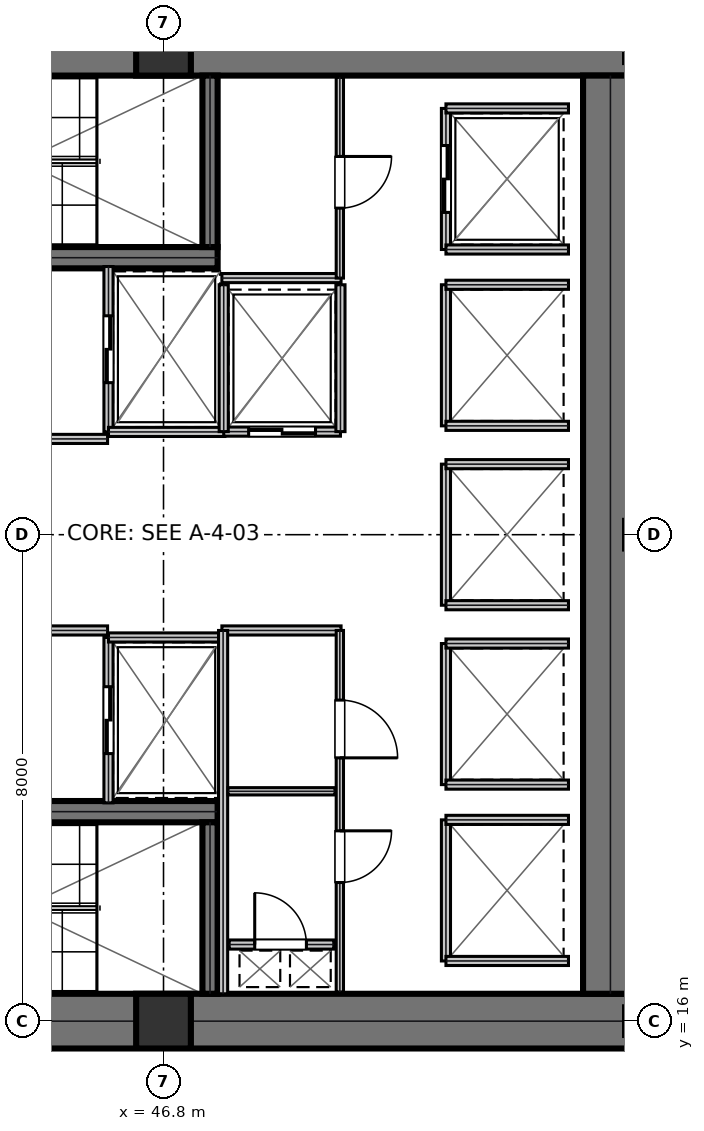
"""IFC4 building model, lengths in metres.
Left out: names, types, materials, properties, quantities, classifications, styles, units other than length and angle.
Written with IfcOpenShell. Run it as: python <this file> out.ifc"""

import sys

from ifc_helpers import new_model, si_unit, direction, frame, frame_2d, origin, origin_2d, place, context, subcontext, project, spatial, rectangle, extrude, element, fill, save


model = new_model("IFC4")
c1 = context("Model", 3, precision=1e-05, world=origin(), true_north=direction((0.0, 1.0)))
c2 = subcontext(c1, "Body", "Model", "MODEL_VIEW")
j1 = project(units=[si_unit("LENGTHUNIT", "METRE"), si_unit("PLANEANGLEUNIT", "RADIAN")], contexts=[c1])
p1 = place(None, origin())
s1 = spatial("IfcSite", under=j1, at=p1, CompositionType="ELEMENT")
p2 = place(p1, origin())
s2 = spatial("IfcBuilding", under=s1, at=p2, CompositionType="ELEMENT")
p3 = place(p2, frame((0.0, 0.0, 27.0)))
s3 = spatial("IfcBuildingStorey", under=s2, at=p3, CompositionType="ELEMENT", Elevation=27.0)
for number, where, z_axis, x_axis in (
    (1, (38.8, 32.0, 0.0), (0.0, 0.0, 1.0), (1.0, 0.0, 0.0)),
    (2, (38.8, 16.0, 0.0), (0.0, 0.0, 1.0), (1.0, 0.0, 0.0)),
):
    element("IfcWall", number, at=place(p3, frame(where, z_axis=z_axis, x_axis=x_axis)), inside=s3, PredefinedType="SHEAR", context=c2, shape_type="SweptSolid", body=[
        extrude(rectangle(XDim=16.0, YDim=0.9, at=frame_2d((8.0, 0.0))), origin(), (0.0, 0.0, 1.0), 5.08),
    ])
p4 = place(p3, frame((54.15, 16.45, 0.0), z_axis=(0.0, 0.0, 1.0), x_axis=(0.0, 1.0, 0.0)))
e3 = element("IfcWall", 3, at=p4, inside=s3, PredefinedType="SHEAR", context=c2, shape_type="SweptSolid", body=[
    extrude(rectangle(XDim=15.1, YDim=0.9, at=frame_2d((7.55, 0.0))), origin(), (0.0, 0.0, 1.0), 5.08),
])
p5 = place(p3, frame((39.98, 28.555, 0.0), z_axis=(0.0, 0.0, 1.0), x_axis=(1.0, 0.0, 0.0)))
e4 = element("IfcWall", 4, at=p5, inside=s3, PredefinedType="SHEAR", context=c2, shape_type="SweptSolid", body=[
    extrude(rectangle(XDim=7.71, YDim=0.35, at=frame_2d((3.855, 0.0))), origin(), (0.0, 0.0, 1.0), 5.08),
])
p6 = place(p5, frame((0.25, 0.0, 0.0)))
e5 = element("IfcOpeningElement", 5, at=p6, cuts=e4, PredefinedType="OPENING", context=c2, shape_type="SweptSolid", body=[
    extrude(rectangle(XDim=1.1, YDim=2.15, at=frame_2d((0.55, 1.075))), frame((0.0, 0.185, 0.0), z_axis=(0.0, -1.0, 0.0), x_axis=(1.0, 0.0, 0.0)), (0.0, 0.0, 1.0), 0.37),
])
p7 = place(p3, frame((39.98, 19.445, 0.0), z_axis=(0.0, 0.0, 1.0), x_axis=(1.0, 0.0, 0.0)))
e6 = element("IfcWall", 6, at=p7, inside=s3, PredefinedType="SHEAR", context=c2, shape_type="SweptSolid", body=[
    extrude(rectangle(XDim=7.71, YDim=0.35, at=frame_2d((3.855, 0.0))), origin(), (0.0, 0.0, 1.0), 5.08),
])
p8 = place(p7, frame((0.25, 0.0, 0.0)))
e7 = element("IfcOpeningElement", 7, at=p8, cuts=e6, PredefinedType="OPENING", context=c2, shape_type="SweptSolid", body=[
    extrude(rectangle(XDim=1.1, YDim=2.15, at=frame_2d((0.55, 1.075))), frame((0.0, 0.185, 0.0), z_axis=(0.0, -1.0, 0.0), x_axis=(1.0, 0.0, 0.0)), (0.0, 0.0, 1.0), 0.37),
])
for number, where, z_axis, x_axis in (
    (8, (47.565, 28.73, 0.0), (0.0, 0.0, 1.0), (0.0, 1.0, 0.0)),
    (9, (47.565, 16.45, 0.0), (0.0, 0.0, 1.0), (0.0, 1.0, 0.0)),
):
    element("IfcWall", number, at=place(p3, frame(where, z_axis=z_axis, x_axis=x_axis)), inside=s3, PredefinedType="SHEAR", context=c2, shape_type="SweptSolid", body=[
        extrude(rectangle(XDim=2.82, YDim=0.25, at=frame_2d((1.41, 0.0))), origin(), (0.0, 0.0, 1.0), 5.08),
    ])
for number, where, z_axis, x_axis in (
    (10, (46.8, 16.0, 0.0), (0.0, 0.0, 1.0), (1.0, 0.0, 0.0)),
    (11, (46.8, 32.0, 0.0), (0.0, 0.0, 1.0), (1.0, 0.0, 0.0)),
):
    element("IfcColumn", number, at=place(p3, frame(where, z_axis=z_axis, x_axis=x_axis)), inside=s3, PredefinedType="COLUMN", context=c2, shape_type="SweptSolid", body=[
        extrude(rectangle(XDim=0.9, YDim=0.9, at=origin_2d()), origin(), (0.0, 0.0, 1.0), 5.395),
    ])
p9 = place(p3, frame((39.98, 25.575, 0.0), z_axis=(0.0, 0.0, 1.0), x_axis=(1.0, 0.0, 0.0)))
e12 = element("IfcWall", 12, at=p9, inside=s3, PredefinedType="PARTITIONING", context=c2, shape_type="SweptSolid", body=[
    extrude(rectangle(XDim=5.9, YDim=0.15, at=frame_2d((2.95, 0.0))), origin(), (0.0, 0.0, 1.0), 5.08),
])
p10 = place(p9, frame((2.35, 0.0, 0.0)))
e13 = element("IfcOpeningElement", 13, at=p10, cuts=e12, PredefinedType="OPENING", context=c2, shape_type="SweptSolid", body=[
    extrude(rectangle(XDim=1.05, YDim=2.15, at=frame_2d((0.525, 1.075))), frame((0.0, 0.085, 0.0), z_axis=(0.0, -1.0, 0.0), x_axis=(1.0, 0.0, 0.0)), (0.0, 0.0, 1.0), 0.17),
])
p11 = place(p3, frame((39.98, 22.425, 0.0), z_axis=(0.0, 0.0, 1.0), x_axis=(1.0, 0.0, 0.0)))
e14 = element("IfcWall", 14, at=p11, inside=s3, PredefinedType="PARTITIONING", context=c2, shape_type="SweptSolid", body=[
    extrude(rectangle(XDim=5.9, YDim=0.15, at=frame_2d((2.95, 0.0))), origin(), (0.0, 0.0, 1.0), 5.08),
])
p12 = place(p11, frame((2.35, 0.0, 0.0)))
e15 = element("IfcOpeningElement", 15, at=p12, cuts=e14, PredefinedType="OPENING", context=c2, shape_type="SweptSolid", body=[
    extrude(rectangle(XDim=1.05, YDim=2.15, at=frame_2d((0.525, 1.075))), frame((0.0, 0.085, 0.0), z_axis=(0.0, -1.0, 0.0), x_axis=(1.0, 0.0, 0.0)), (0.0, 0.0, 1.0), 0.17),
])
p13 = place(p3, frame((45.895, 25.69, 0.0), z_axis=(0.0, 0.0, 1.0), x_axis=(0.0, 1.0, 0.0)))
e16 = element("IfcWall", 16, at=p13, inside=s3, PredefinedType="PARTITIONING", context=c2, shape_type="SweptSolid", body=[
    extrude(rectangle(XDim=2.72, YDim=0.15, at=frame_2d((1.36, 0.0))), origin(), (0.0, 0.0, 1.0), 5.08),
])
p14 = place(p13, frame((0.81, 0.0, 0.0)))
e17 = element("IfcOpeningElement", 17, at=p14, cuts=e16, PredefinedType="OPENING", context=c2, shape_type="SweptSolid", body=[
    extrude(rectangle(XDim=1.1, YDim=2.15, at=frame_2d((0.55, 1.075))), frame((0.0, 0.085, 0.0), z_axis=(0.0, -1.0, 0.0), x_axis=(1.0, 0.0, 0.0)), (0.0, 0.0, 1.0), 0.17),
])
p15 = place(p3, frame((45.895, 25.69, 0.0), z_axis=(0.0, 0.0, 1.0), x_axis=(1.0, 0.0, 0.0)))
e18 = element("IfcWall", 18, at=p15, inside=s3, PredefinedType="PARTITIONING", context=c2, shape_type="SweptSolid", body=[
    extrude(rectangle(XDim=1.915, YDim=0.15, at=frame_2d((0.958, 0.0))), origin(), (0.0, 0.0, 1.0), 5.08),
])
p16 = place(p3, frame((45.895, 19.59, 0.0), z_axis=(0.0, 0.0, 1.0), x_axis=(0.0, 1.0, 0.0)))
e19 = element("IfcWall", 19, at=p16, inside=s3, PredefinedType="PARTITIONING", context=c2, shape_type="SweptSolid", body=[
    extrude(rectangle(XDim=2.72, YDim=0.15, at=frame_2d((1.36, 0.0))), origin(), (0.0, 0.0, 1.0), 5.08),
])
p17 = place(p16, frame((0.81, 0.0, 0.0)))
e20 = element("IfcOpeningElement", 20, at=p17, cuts=e19, PredefinedType="OPENING", context=c2, shape_type="SweptSolid", body=[
    extrude(rectangle(XDim=1.1, YDim=2.15, at=frame_2d((0.55, 1.075))), frame((0.0, 0.085, 0.0), z_axis=(0.0, -1.0, 0.0), x_axis=(1.0, 0.0, 0.0)), (0.0, 0.0, 1.0), 0.17),
])
p18 = place(p3, frame((45.895, 22.31, 0.0), z_axis=(0.0, 0.0, 1.0), x_axis=(1.0, 0.0, 0.0)))
e21 = element("IfcWall", 21, at=p18, inside=s3, PredefinedType="PARTITIONING", context=c2, shape_type="SweptSolid", body=[
    extrude(rectangle(XDim=1.915, YDim=0.15, at=frame_2d((0.958, 0.0))), origin(), (0.0, 0.0, 1.0), 5.08),
])
p19 = place(p3, frame((47.79, 25.695, 0.0), z_axis=(0.0, 0.0, 1.0), x_axis=(1.0, 0.0, 0.0)))
e22 = element("IfcWall", 22, at=p19, inside=s3, PredefinedType="PARTITIONING", context=c2, shape_type="SweptSolid", body=[
    extrude(rectangle(XDim=1.92, YDim=0.15, at=frame_2d((0.96, 0.0))), origin(), (0.0, 0.0, 1.0), 5.08),
])
p20 = place(p19, frame((0.41, 0.0, 0.0)))
e23 = element("IfcOpeningElement", 23, at=p20, cuts=e22, PredefinedType="OPENING", context=c2, shape_type="SweptSolid", body=[
    extrude(rectangle(XDim=1.1, YDim=2.15, at=frame_2d((0.55, 1.075))), frame((0.0, 0.085, 0.0), z_axis=(0.0, -1.0, 0.0), x_axis=(1.0, 0.0, 0.0)), (0.0, 0.0, 1.0), 0.17),
])
for number, where, z_axis, x_axis in (
    (24, (47.79, 25.695, 0.0), (0.0, 0.0, 1.0), (0.0, 1.0, 0.0)),
    (25, (49.71, 25.695, 0.0), (0.0, 0.0, 1.0), (0.0, 1.0, 0.0)),
):
    element("IfcWall", number, at=place(p3, frame(where, z_axis=z_axis, x_axis=x_axis)), inside=s3, PredefinedType="PARTITIONING", context=c2, shape_type="SweptSolid", body=[
        extrude(rectangle(XDim=2.415, YDim=0.15, at=frame_2d((1.208, 0.0))), origin(), (0.0, 0.0, 1.0), 5.08),
    ])
p21 = place(p3, frame((51.445, 28.69, 0.0), z_axis=(0.0, 0.0, 1.0), x_axis=(0.0, 1.0, 0.0)))
e26 = element("IfcWall", 26, at=p21, inside=s3, PredefinedType="PARTITIONING", context=c2, shape_type="SweptSolid", body=[
    extrude(rectangle(XDim=2.32, YDim=0.15, at=frame_2d((1.16, 0.0))), origin(), (0.0, 0.0, 1.0), 5.08),
])
p22 = place(p21, frame((0.61, 0.0, 0.0)))
e27 = element("IfcOpeningElement", 27, at=p22, cuts=e26, PredefinedType="OPENING", context=c2, shape_type="SweptSolid", body=[
    extrude(rectangle(XDim=1.1, YDim=2.15, at=frame_2d((0.55, 1.075))), frame((0.0, 0.085, 0.0), z_axis=(0.0, -1.0, 0.0), x_axis=(1.0, 0.0, 0.0)), (0.0, 0.0, 1.0), 0.17),
])
for number, where, z_axis, x_axis in (
    (28, (51.445, 28.69, 0.0), (0.0, 0.0, 1.0), (1.0, 0.0, 0.0)),
    (29, (51.445, 31.01, 0.0), (0.0, 0.0, 1.0), (1.0, 0.0, 0.0)),
):
    element("IfcWall", number, at=place(p3, frame(where, z_axis=z_axis, x_axis=x_axis)), inside=s3, PredefinedType="PARTITIONING", context=c2, shape_type="SweptSolid", body=[
        extrude(rectangle(XDim=2.015, YDim=0.15, at=frame_2d((1.007, 0.0))), origin(), (0.0, 0.0, 1.0), 5.08),
    ])
p23 = place(p3, frame((51.445, 25.79, 0.0), z_axis=(0.0, 0.0, 1.0), x_axis=(0.0, 1.0, 0.0)))
e30 = element("IfcWall", 30, at=p23, inside=s3, PredefinedType="PARTITIONING", context=c2, shape_type="SweptSolid", body=[
    extrude(rectangle(XDim=2.32, YDim=0.15, at=frame_2d((1.16, 0.0))), origin(), (0.0, 0.0, 1.0), 5.08),
])
for number, where, z_axis, x_axis in (
    (31, (51.445, 25.79, 0.0), (0.0, 0.0, 1.0), (1.0, 0.0, 0.0)),
    (32, (51.445, 28.11, 0.0), (0.0, 0.0, 1.0), (1.0, 0.0, 0.0)),
):
    element("IfcWall", number, at=place(p3, frame(where, z_axis=z_axis, x_axis=x_axis)), inside=s3, PredefinedType="PARTITIONING", context=c2, shape_type="SweptSolid", body=[
        extrude(rectangle(XDim=2.015, YDim=0.15, at=frame_2d((1.007, 0.0))), origin(), (0.0, 0.0, 1.0), 5.08),
    ])
p24 = place(p3, frame((51.445, 19.89, 0.0), z_axis=(0.0, 0.0, 1.0), x_axis=(0.0, 1.0, 0.0)))
e33 = element("IfcWall", 33, at=p24, inside=s3, PredefinedType="PARTITIONING", context=c2, shape_type="SweptSolid", body=[
    extrude(rectangle(XDim=2.32, YDim=0.15, at=frame_2d((1.16, 0.0))), origin(), (0.0, 0.0, 1.0), 5.08),
])
for number, where, z_axis, x_axis in (
    (34, (51.445, 19.89, 0.0), (0.0, 0.0, 1.0), (1.0, 0.0, 0.0)),
    (35, (51.445, 22.21, 0.0), (0.0, 0.0, 1.0), (1.0, 0.0, 0.0)),
):
    element("IfcWall", number, at=place(p3, frame(where, z_axis=z_axis, x_axis=x_axis)), inside=s3, PredefinedType="PARTITIONING", context=c2, shape_type="SweptSolid", body=[
        extrude(rectangle(XDim=2.015, YDim=0.15, at=frame_2d((1.007, 0.0))), origin(), (0.0, 0.0, 1.0), 5.08),
    ])
p25 = place(p3, frame((51.445, 22.84, 0.0), z_axis=(0.0, 0.0, 1.0), x_axis=(0.0, 1.0, 0.0)))
e36 = element("IfcWall", 36, at=p25, inside=s3, PredefinedType="PARTITIONING", context=c2, shape_type="SweptSolid", body=[
    extrude(rectangle(XDim=2.32, YDim=0.15, at=frame_2d((1.16, 0.0))), origin(), (0.0, 0.0, 1.0), 5.08),
])
for number, where, z_axis, x_axis in (
    (37, (51.445, 22.84, 0.0), (0.0, 0.0, 1.0), (1.0, 0.0, 0.0)),
    (38, (51.445, 25.16, 0.0), (0.0, 0.0, 1.0), (1.0, 0.0, 0.0)),
):
    element("IfcWall", number, at=place(p3, frame(where, z_axis=z_axis, x_axis=x_axis)), inside=s3, PredefinedType="PARTITIONING", context=c2, shape_type="SweptSolid", body=[
        extrude(rectangle(XDim=2.015, YDim=0.15, at=frame_2d((1.007, 0.0))), origin(), (0.0, 0.0, 1.0), 5.08),
    ])
p26 = place(p3, frame((51.445, 16.99, 0.0), z_axis=(0.0, 0.0, 1.0), x_axis=(0.0, 1.0, 0.0)))
e39 = element("IfcWall", 39, at=p26, inside=s3, PredefinedType="PARTITIONING", context=c2, shape_type="SweptSolid", body=[
    extrude(rectangle(XDim=2.32, YDim=0.15, at=frame_2d((1.16, 0.0))), origin(), (0.0, 0.0, 1.0), 5.08),
])
for number, where, z_axis, x_axis in (
    (40, (51.445, 16.99, 0.0), (0.0, 0.0, 1.0), (1.0, 0.0, 0.0)),
    (41, (51.445, 19.31, 0.0), (0.0, 0.0, 1.0), (1.0, 0.0, 0.0)),
):
    element("IfcWall", number, at=place(p3, frame(where, z_axis=z_axis, x_axis=x_axis)), inside=s3, PredefinedType="PARTITIONING", context=c2, shape_type="SweptSolid", body=[
        extrude(rectangle(XDim=2.015, YDim=0.15, at=frame_2d((1.007, 0.0))), origin(), (0.0, 0.0, 1.0), 5.08),
    ])
p27 = place(p3, frame((47.88, 17.26, 0.0), z_axis=(0.0, 0.0, 1.0), x_axis=(1.0, 0.0, 0.0)))
e42 = element("IfcWall", 42, at=p27, inside=s3, PredefinedType="PARTITIONING", context=c2, shape_type="SweptSolid", body=[
    extrude(rectangle(XDim=1.72, YDim=0.15, at=frame_2d((0.86, 0.0))), origin(), (0.0, 0.0, 1.0), 5.08),
])
p28 = place(p27, frame((0.42, 0.0, 0.0)))
e43 = element("IfcOpeningElement", 43, at=p28, cuts=e42, PredefinedType="OPENING", context=c2, shape_type="SweptSolid", body=[
    extrude(rectangle(XDim=0.85, YDim=2.15, at=frame_2d((0.425, 1.075))), frame((0.0, 0.085, 0.0), z_axis=(0.0, -1.0, 0.0), x_axis=(1.0, 0.0, 0.0)), (0.0, 0.0, 1.0), 0.17),
])
p29 = place(p3, frame((47.76, 22.425, 0.0), z_axis=(0.0, 0.0, 1.0), x_axis=(1.0, 0.0, 0.0)))
e44 = element("IfcWall", 44, at=p29, inside=s3, PredefinedType="PARTITIONING", context=c2, shape_type="SweptSolid", body=[
    extrude(rectangle(XDim=1.96, YDim=0.15, at=frame_2d((0.98, 0.0))), origin(), (0.0, 0.0, 1.0), 5.08),
])
p30 = place(p3, frame((47.78, 16.45, 0.0), z_axis=(0.0, 0.0, 1.0), x_axis=(0.0, 1.0, 0.0)))
e45 = element("IfcWall", 45, at=p30, inside=s3, PredefinedType="PARTITIONING", context=c2, shape_type="SweptSolid", body=[
    extrude(rectangle(XDim=5.975, YDim=0.15, at=frame_2d((2.988, 0.0))), origin(), (0.0, 0.0, 1.0), 5.08),
])
p31 = place(p3, frame((47.86, 19.78, 0.0), z_axis=(0.0, 0.0, 1.0), x_axis=(1.0, 0.0, 0.0)))
e46 = element("IfcWall", 46, at=p31, inside=s3, PredefinedType="PARTITIONING", context=c2, shape_type="SweptSolid", body=[
    extrude(rectangle(XDim=1.76, YDim=0.12, at=frame_2d((0.88, 0.0))), origin(), (0.0, 0.0, 1.0), 5.08),
])
p32 = place(p3, frame((49.7, 16.48, 0.0), z_axis=(0.0, 0.0, 1.0), x_axis=(0.0, 1.0, 0.0)))
e47 = element("IfcWall", 47, at=p32, inside=s3, PredefinedType="PARTITIONING", context=c2, shape_type="SweptSolid", body=[
    extrude(rectangle(XDim=5.945, YDim=0.12, at=frame_2d((2.973, 0.0))), origin(), (0.0, 0.0, 1.0), 5.08),
])
p33 = place(p32, frame((1.8, 0.0, 0.0)))
e48 = element("IfcOpeningElement", 48, at=p33, cuts=e47, PredefinedType="OPENING", context=c2, shape_type="SweptSolid", body=[
    extrude(rectangle(XDim=0.85, YDim=2.15, at=frame_2d((0.425, 1.075))), frame((0.0, 0.07, 0.0), z_axis=(0.0, -1.0, 0.0), x_axis=(1.0, 0.0, 0.0)), (0.0, 0.0, 1.0), 0.14),
])
p34 = place(p32, frame((3.85, 0.0, 0.0)))
e49 = element("IfcOpeningElement", 49, at=p34, cuts=e47, PredefinedType="OPENING", context=c2, shape_type="SweptSolid", body=[
    extrude(rectangle(XDim=0.95, YDim=2.15, at=frame_2d((0.475, 1.075))), frame((0.0, 0.07, 0.0), z_axis=(0.0, -1.0, 0.0), x_axis=(1.0, 0.0, 0.0)), (0.0, 0.0, 1.0), 0.14),
])
p35 = place(p3, frame((47.76, 28.22, 0.0), z_axis=(0.0, 0.0, 1.0), x_axis=(1.0, 0.0, 0.0)))
e50 = element("IfcWall", 50, at=p35, inside=s3, PredefinedType="PARTITIONING", context=c2, shape_type="SweptSolid", body=[
    extrude(rectangle(XDim=1.96, YDim=0.15, at=frame_2d((0.98, 0.0))), origin(), (0.0, 0.0, 1.0), 5.08),
])
p36 = place(p3, frame((49.7, 28.22, 0.0), z_axis=(0.0, 0.0, 1.0), x_axis=(0.0, 1.0, 0.0)))
e51 = element("IfcWall", 51, at=p36, inside=s3, PredefinedType="PARTITIONING", context=c2, shape_type="SweptSolid", body=[
    extrude(rectangle(XDim=3.3, YDim=0.12, at=frame_2d((1.65, 0.0))), origin(), (0.0, 0.0, 1.0), 5.08),
])
p37 = place(p36, frame((1.15, 0.0, 0.0)))
e52 = element("IfcOpeningElement", 52, at=p37, cuts=e51, PredefinedType="OPENING", context=c2, shape_type="SweptSolid", body=[
    extrude(rectangle(XDim=0.85, YDim=2.15, at=frame_2d((0.425, 1.075))), frame((0.0, 0.07, 0.0), z_axis=(0.0, -1.0, 0.0), x_axis=(1.0, 0.0, 0.0)), (0.0, 0.0, 1.0), 0.14),
])
p38 = place(p14, frame((1.1, 0.0, 0.0), z_axis=(0.0, 0.0, 1.0), x_axis=(-1.0, 0.0, 0.0)))
e53 = element("IfcDoor", 53, at=p38, inside=s3, OperationType="DOUBLE_DOOR_SLIDING", PredefinedType="DOOR", context=c2, shape_type="SweptSolid", body=[
    extrude(rectangle(XDim=1.1, YDim=2.15, at=frame_2d((0.55, 1.075))), frame((0.0, 0.025, 0.0), z_axis=(0.0, -1.0, 0.0), x_axis=(1.0, 0.0, 0.0)), (0.0, 0.0, 1.0), 0.05),
])
fill(e17, e53)
p39 = place(p17, frame((1.1, 0.0, 0.0), z_axis=(0.0, 0.0, 1.0), x_axis=(-1.0, 0.0, 0.0)))
e54 = element("IfcDoor", 54, at=p39, inside=s3, OperationType="DOUBLE_DOOR_SLIDING", PredefinedType="DOOR", context=c2, shape_type="SweptSolid", body=[
    extrude(rectangle(XDim=1.1, YDim=2.15, at=frame_2d((0.55, 1.075))), frame((0.0, 0.025, 0.0), z_axis=(0.0, -1.0, 0.0), x_axis=(1.0, 0.0, 0.0)), (0.0, 0.0, 1.0), 0.05),
])
fill(e20, e54)
p40 = place(p20, frame((1.1, 0.0, 0.0), z_axis=(0.0, 0.0, 1.0), x_axis=(-1.0, 0.0, 0.0)))
e55 = element("IfcDoor", 55, at=p40, inside=s3, OperationType="DOUBLE_DOOR_SLIDING", PredefinedType="DOOR", context=c2, shape_type="SweptSolid", body=[
    extrude(rectangle(XDim=1.1, YDim=2.15, at=frame_2d((0.55, 1.075))), frame((0.0, 0.025, 0.0), z_axis=(0.0, -1.0, 0.0), x_axis=(1.0, 0.0, 0.0)), (0.0, 0.0, 1.0), 0.05),
])
fill(e23, e55)
p41 = place(p22, frame((1.1, 0.0, 0.0), z_axis=(0.0, 0.0, 1.0), x_axis=(-1.0, 0.0, 0.0)))
e56 = element("IfcDoor", 56, at=p41, inside=s3, OperationType="DOUBLE_DOOR_SLIDING", PredefinedType="DOOR", context=c2, shape_type="SweptSolid", body=[
    extrude(rectangle(XDim=1.1, YDim=2.15, at=frame_2d((0.55, 1.075))), frame((0.0, 0.025, 0.0), z_axis=(0.0, -1.0, 0.0), x_axis=(1.0, 0.0, 0.0)), (0.0, 0.0, 1.0), 0.05),
])
fill(e27, e56)
p42 = place(p28, origin())
e57 = element("IfcDoor", 57, at=p42, inside=s3, OperationType="SINGLE_SWING_LEFT", PredefinedType="TRAPDOOR", context=c2, shape_type="SweptSolid", body=[
    extrude(rectangle(XDim=0.85, YDim=2.15, at=frame_2d((0.425, 1.075))), frame((0.0, 0.025, 0.0), z_axis=(0.0, -1.0, 0.0), x_axis=(1.0, 0.0, 0.0)), (0.0, 0.0, 1.0), 0.05),
])
fill(e43, e57)
p43 = place(p33, frame((0.85, 0.0, 0.0), z_axis=(0.0, 0.0, 1.0), x_axis=(-1.0, 0.0, 0.0)))
e58 = element("IfcDoor", 58, at=p43, inside=s3, OperationType="SINGLE_SWING_LEFT", PredefinedType="DOOR", context=c2, shape_type="SweptSolid", body=[
    extrude(rectangle(XDim=0.85, YDim=2.15, at=frame_2d((0.425, 1.075))), frame((0.0, 0.025, 0.0), z_axis=(0.0, -1.0, 0.0), x_axis=(1.0, 0.0, 0.0)), (0.0, 0.0, 1.0), 0.05),
])
fill(e48, e58)
p44 = place(p34, frame((0.95, 0.0, 0.0), z_axis=(0.0, 0.0, 1.0), x_axis=(-1.0, 0.0, 0.0)))
e59 = element("IfcDoor", 59, at=p44, inside=s3, OperationType="SINGLE_SWING_RIGHT", PredefinedType="DOOR", context=c2, shape_type="SweptSolid", body=[
    extrude(rectangle(XDim=0.95, YDim=2.15, at=frame_2d((0.475, 1.075))), frame((0.0, 0.025, 0.0), z_axis=(0.0, -1.0, 0.0), x_axis=(1.0, 0.0, 0.0)), (0.0, 0.0, 1.0), 0.05),
])
fill(e49, e59)
p45 = place(p37, frame((0.85, 0.0, 0.0), z_axis=(0.0, 0.0, 1.0), x_axis=(-1.0, 0.0, 0.0)))
e60 = element("IfcDoor", 60, at=p45, inside=s3, OperationType="SINGLE_SWING_LEFT", PredefinedType="DOOR", context=c2, shape_type="SweptSolid", body=[
    extrude(rectangle(XDim=0.85, YDim=2.15, at=frame_2d((0.425, 1.075))), frame((0.0, 0.025, 0.0), z_axis=(0.0, -1.0, 0.0), x_axis=(1.0, 0.0, 0.0)), (0.0, 0.0, 1.0), 0.05),
])
fill(e52, e60)
save(model, sys.argv[1])
